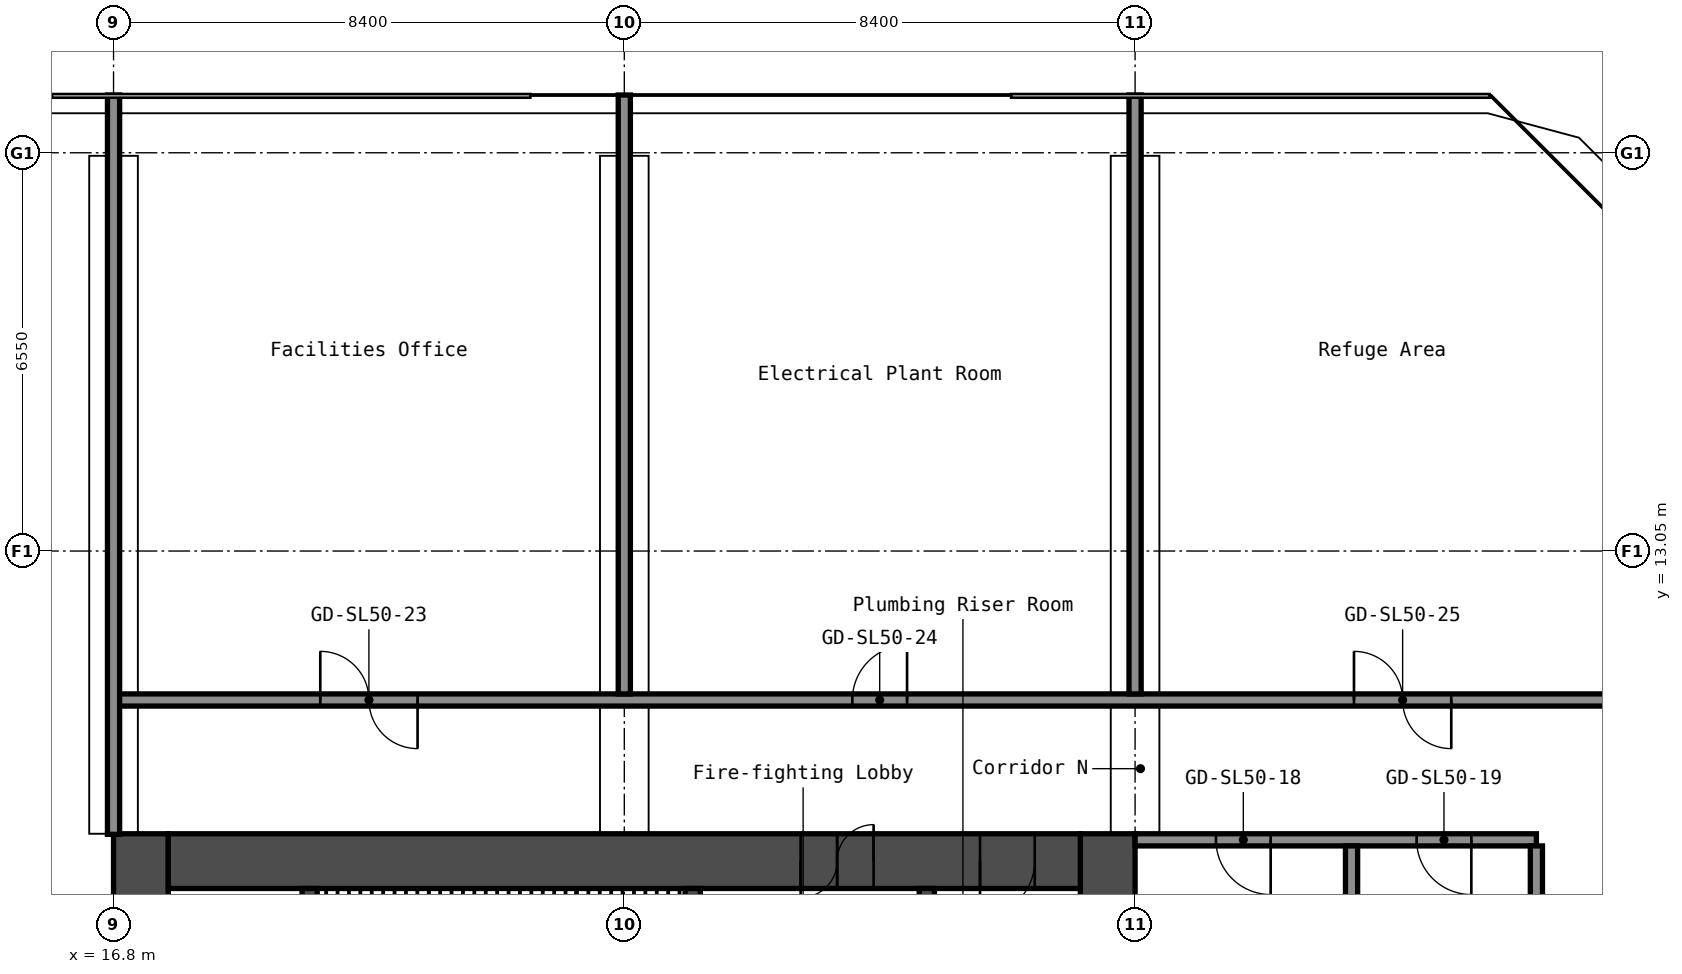
"""IFC4 building model, lengths in metres.
Left out: names, types, materials, properties, quantities, classifications, styles, units other than length and angle.
Written with IfcOpenShell. Run it as: python <this file> out.ifc"""

import sys

from ifc_helpers import new_model, si_unit, direction, frame, frame_2d, origin, place, context, subcontext, project, spatial, rectangle, extrude, element, fill, save


model = new_model("IFC4")
c1 = context("Model", 3, precision=1e-05, world=origin(), true_north=direction((0.0, 1.0)))
c2 = subcontext(c1, "Body", "Model", "MODEL_VIEW")
j1 = project(units=[si_unit("LENGTHUNIT", "METRE"), si_unit("PLANEANGLEUNIT", "RADIAN")], contexts=[c1])
p1 = place(None, origin())
s1 = spatial("IfcSite", under=j1, at=p1, CompositionType="ELEMENT")
p2 = place(p1, origin())
s2 = spatial("IfcBuilding", under=s1, at=p2, CompositionType="ELEMENT")
p3 = place(p2, frame((0.0, 0.0, 175.8)))
s3 = spatial("IfcBuildingStorey", under=s2, at=p3, CompositionType="ELEMENT", Elevation=175.8)
p4 = place(p3, frame((17.25, -8.4, 0.0), z_axis=(0.0, 0.0, 1.0), x_axis=(0.0, 1.0, 0.0)))
e1 = element("IfcWall", 1, at=p4, inside=s3, PredefinedType="SHEAR", context=c2, shape_type="SweptSolid", body=[
    extrude(rectangle(XDim=16.8, YDim=0.9, at=frame_2d((8.4, 0.0))), origin(), (0.0, 0.0, 1.0), 4.1),
])
p5 = place(p4, frame((10.1, 0.0, 0.0)))
e2 = element("IfcOpeningElement", 2, at=p5, cuts=e1, PredefinedType="OPENING", context=c2, shape_type="SweptSolid", body=[
    extrude(rectangle(XDim=1.6, YDim=2.1, at=frame_2d((0.8, 1.05))), frame((0.0, 0.46, 0.0), z_axis=(0.0, -1.0, 0.0), x_axis=(1.0, 0.0, 0.0)), (0.0, 0.0, 1.0), 0.92),
])
p6 = place(p3, frame((33.15, -8.4, 0.0), z_axis=(0.0, 0.0, 1.0), x_axis=(0.0, 1.0, 0.0)))
e3 = element("IfcWall", 3, at=p6, inside=s3, PredefinedType="SHEAR", context=c2, shape_type="SweptSolid", body=[
    extrude(rectangle(XDim=16.8, YDim=0.9, at=frame_2d((8.4, 0.0))), origin(), (0.0, 0.0, 1.0), 4.1),
])
p7 = place(p3, frame((17.7, 7.95, 0.0), z_axis=(0.0, 0.0, 1.0), x_axis=(1.0, 0.0, 0.0)))
e4 = element("IfcWall", 4, at=p7, inside=s3, PredefinedType="SHEAR", context=c2, shape_type="SweptSolid", body=[
    extrude(rectangle(XDim=15.0, YDim=0.9, at=frame_2d((7.5, 0.0))), origin(), (0.0, 0.0, 1.0), 4.1),
])
p8 = place(p7, frame((10.4, 0.0, 0.0)))
e5 = element("IfcOpeningElement", 5, at=p8, cuts=e4, PredefinedType="OPENING", context=c2, shape_type="SweptSolid", body=[
    extrude(rectangle(XDim=1.2, YDim=2.1, at=frame_2d((0.6, 1.05))), frame((0.0, 0.46, 0.0), z_axis=(0.0, -1.0, 0.0), x_axis=(1.0, 0.0, 0.0)), (0.0, 0.0, 1.0), 0.92),
])
p9 = place(p7, frame((13.35, 0.0, 0.0)))
e6 = element("IfcOpeningElement", 6, at=p9, cuts=e4, PredefinedType="OPENING", context=c2, shape_type="SweptSolid", body=[
    extrude(rectangle(XDim=0.9, YDim=2.1, at=frame_2d((0.45, 1.05))), frame((0.0, 0.46, 0.0), z_axis=(0.0, -1.0, 0.0), x_axis=(1.0, 0.0, 0.0)), (0.0, 0.0, 1.0), 0.92),
])
p10 = place(p3, frame((20.025, 1.2, 0.0), z_axis=(0.0, 0.0, 1.0), x_axis=(0.0, 1.0, 0.0)))
e7 = element("IfcWall", 7, at=p10, inside=s3, PredefinedType="SHEAR", context=c2, shape_type="SweptSolid", body=[
    extrude(rectangle(XDim=6.3, YDim=0.25, at=frame_2d((3.15, 0.0))), origin(), (0.0, 0.0, 1.0), 4.1),
])
p11 = place(p3, frame((26.325, 3.75, 0.0), z_axis=(0.0, 0.0, 1.0), x_axis=(0.0, 1.0, 0.0)))
e8 = element("IfcWall", 8, at=p11, inside=s3, PredefinedType="SHEAR", context=c2, shape_type="SweptSolid", body=[
    extrude(rectangle(XDim=3.75, YDim=0.25, at=frame_2d((1.875, 0.0))), origin(), (0.0, 0.0, 1.0), 4.1),
])
p12 = place(p11, frame((1.25, 0.0, 0.0)))
e9 = element("IfcOpeningElement", 9, at=p12, cuts=e8, PredefinedType="OPENING", context=c2, shape_type="SweptSolid", body=[
    extrude(rectangle(XDim=1.2, YDim=2.1, at=frame_2d((0.6, 1.05))), frame((0.0, 0.135, 0.0), z_axis=(0.0, -1.0, 0.0), x_axis=(1.0, 0.0, 0.0)), (0.0, 0.0, 1.0), 0.27),
])
p13 = place(p3, frame((30.175, 1.45, 0.0), z_axis=(0.0, 0.0, 1.0), x_axis=(0.0, 1.0, 0.0)))
e10 = element("IfcWall", 10, at=p13, inside=s3, PredefinedType="SHEAR", context=c2, shape_type="SweptSolid", body=[
    extrude(rectangle(XDim=6.05, YDim=0.25, at=frame_2d((3.025, 0.0))), origin(), (0.0, 0.0, 1.0), 4.1),
])
p14 = place(p13, frame((2.625, 0.0, 0.0)))
e11 = element("IfcOpeningElement", 11, at=p14, cuts=e10, PredefinedType="OPENING", context=c2, shape_type="SweptSolid", body=[
    extrude(rectangle(XDim=1.1, YDim=2.1, at=frame_2d((0.55, 1.05))), frame((0.0, 0.135, 0.0), z_axis=(0.0, -1.0, 0.0), x_axis=(1.0, 0.0, 0.0)), (0.0, 0.0, 1.0), 0.27),
])
p15 = place(p3, frame((33.6, 8.3, 0.0), z_axis=(0.0, 0.0, 1.0), x_axis=(1.0, 0.0, 0.0)))
e12 = element("IfcWall", 12, at=p15, inside=s3, PredefinedType="PARTITIONING", context=c2, shape_type="SweptSolid", body=[
    extrude(rectangle(XDim=6.6, YDim=0.2, at=frame_2d((3.3, 0.0))), origin(), (0.0, 0.0, 1.0), 4.1),
])
p16 = place(p15, frame((1.33, 0.0, 0.0)))
e13 = element("IfcOpeningElement", 13, at=p16, cuts=e12, PredefinedType="OPENING", context=c2, shape_type="SweptSolid", body=[
    extrude(rectangle(XDim=0.9, YDim=2.1, at=frame_2d((0.45, 1.05))), frame((0.0, 0.11, 0.0), z_axis=(0.0, -1.0, 0.0), x_axis=(1.0, 0.0, 0.0)), (0.0, 0.0, 1.0), 0.22),
])
p17 = place(p15, frame((4.63, 0.0, 0.0)))
e14 = element("IfcOpeningElement", 14, at=p17, cuts=e12, PredefinedType="OPENING", context=c2, shape_type="SweptSolid", body=[
    extrude(rectangle(XDim=0.9, YDim=2.1, at=frame_2d((0.45, 1.05))), frame((0.0, 0.11, 0.0), z_axis=(0.0, -1.0, 0.0), x_axis=(1.0, 0.0, 0.0)), (0.0, 0.0, 1.0), 0.22),
])
p18 = place(p3, frame((16.8, 10.6, 0.0), z_axis=(0.0, 0.0, 1.0), x_axis=(1.0, 0.0, 0.0)))
e15 = element("IfcWall", 15, at=p18, inside=s3, PredefinedType="PARTITIONING", context=c2, shape_type="SweptSolid", body=[
    extrude(rectangle(XDim=25.9, YDim=0.2, at=frame_2d((12.95, 0.0))), origin(), (0.0, 0.0, 1.0), 4.1),
])
p19 = place(p18, frame((3.4, 0.0, 0.0)))
e16 = element("IfcOpeningElement", 16, at=p19, cuts=e15, PredefinedType="OPENING", context=c2, shape_type="SweptSolid", body=[
    extrude(rectangle(XDim=1.6, YDim=2.1, at=frame_2d((0.8, 1.05))), frame((0.0, 0.11, 0.0), z_axis=(0.0, -1.0, 0.0), x_axis=(1.0, 0.0, 0.0)), (0.0, 0.0, 1.0), 0.22),
])
p20 = place(p18, frame((12.15, 0.0, 0.0)))
e17 = element("IfcOpeningElement", 17, at=p20, cuts=e15, PredefinedType="OPENING", context=c2, shape_type="SweptSolid", body=[
    extrude(rectangle(XDim=0.9, YDim=2.1, at=frame_2d((0.45, 1.05))), frame((0.0, 0.11, 0.0), z_axis=(0.0, -1.0, 0.0), x_axis=(1.0, 0.0, 0.0)), (0.0, 0.0, 1.0), 0.22),
])
p21 = place(p18, frame((20.4, 0.0, 0.0)))
e18 = element("IfcOpeningElement", 18, at=p21, cuts=e15, PredefinedType="OPENING", context=c2, shape_type="SweptSolid", body=[
    extrude(rectangle(XDim=1.6, YDim=2.1, at=frame_2d((0.8, 1.05))), frame((0.0, 0.11, 0.0), z_axis=(0.0, -1.0, 0.0), x_axis=(1.0, 0.0, 0.0)), (0.0, 0.0, 1.0), 0.22),
])
p22 = place(p3, frame((16.8, 8.39, 0.0), z_axis=(0.0, 0.0, 1.0), x_axis=(0.0, 1.0, 0.0)))
e19 = element("IfcWall", 19, at=p22, inside=s3, PredefinedType="PARTITIONING", context=c2, shape_type="SweptSolid", body=[
    extrude(rectangle(XDim=12.16, YDim=0.2, at=frame_2d((6.08, 0.0))), origin(), (0.0, 0.0, 1.0), 4.1),
])
for number, where, z_axis, x_axis in (
    (20, (25.2, 10.7, 0.0), (0.0, 0.0, 1.0), (0.0, 1.0, 0.0)),
    (21, (33.6, 10.7, 0.0), (0.0, 0.0, 1.0), (0.0, 1.0, 0.0)),
):
    element("IfcWall", number, at=place(p3, frame(where, z_axis=z_axis, x_axis=x_axis)), inside=s3, PredefinedType="PARTITIONING", context=c2, shape_type="SweptSolid", body=[
        extrude(rectangle(XDim=9.85, YDim=0.2, at=frame_2d((4.925, 0.0))), origin(), (0.0, 0.0, 1.0), 4.1),
    ])
p23 = place(p3, frame((37.16, 0.0, 0.0), z_axis=(0.0, 0.0, 1.0), x_axis=(0.0, 1.0, 0.0)))
e22 = element("IfcWall", 22, at=p23, inside=s3, PredefinedType="PARTITIONING", context=c2, shape_type="SweptSolid", body=[
    extrude(rectangle(XDim=8.2, YDim=0.2, at=frame_2d((4.1, 0.0))), origin(), (0.0, 0.0, 1.0), 4.1),
])
p24 = place(p3, frame((40.2, -8.2, 0.0), z_axis=(0.0, 0.0, 1.0), x_axis=(0.0, 1.0, 0.0)))
e23 = element("IfcWall", 23, at=p24, inside=s3, PredefinedType="PARTITIONING", context=c2, shape_type="SweptSolid", body=[
    extrude(rectangle(XDim=16.4, YDim=0.2, at=frame_2d((8.2, 0.0))), origin(), (0.0, 0.0, 1.0), 4.1),
])
p25 = place(p8, origin())
e24 = element("IfcDoor", 24, at=p25, inside=s3, OperationType="DOUBLE_DOOR_SINGLE_SWING", PredefinedType="DOOR", context=c2, shape_type="SweptSolid", body=[
    extrude(rectangle(XDim=1.2, YDim=2.1, at=frame_2d((0.6, 1.05))), frame((0.0, 0.025, 0.0), z_axis=(0.0, -1.0, 0.0), x_axis=(1.0, 0.0, 0.0)), (0.0, 0.0, 1.0), 0.05),
])
fill(e5, e24)
p26 = place(p9, origin())
e25 = element("IfcDoor", 25, at=p26, inside=s3, OperationType="SINGLE_SWING_LEFT", PredefinedType="DOOR", context=c2, shape_type="SweptSolid", body=[
    extrude(rectangle(XDim=0.9, YDim=2.1, at=frame_2d((0.45, 1.05))), frame((0.0, 0.025, 0.0), z_axis=(0.0, -1.0, 0.0), x_axis=(1.0, 0.0, 0.0)), (0.0, 0.0, 1.0), 0.05),
])
fill(e6, e25)
p27 = place(p16, origin())
e26 = element("IfcDoor", 26, at=p27, inside=s3, OperationType="SINGLE_SWING_RIGHT", PredefinedType="DOOR", context=c2, shape_type="SweptSolid", body=[
    extrude(rectangle(XDim=0.9, YDim=2.1, at=frame_2d((0.45, 1.05))), frame((0.0, 0.025, 0.0), z_axis=(0.0, -1.0, 0.0), x_axis=(1.0, 0.0, 0.0)), (0.0, 0.0, 1.0), 0.05),
])
fill(e13, e26)
p28 = place(p17, origin())
e27 = element("IfcDoor", 27, at=p28, inside=s3, OperationType="SINGLE_SWING_RIGHT", PredefinedType="DOOR", context=c2, shape_type="SweptSolid", body=[
    extrude(rectangle(XDim=0.9, YDim=2.1, at=frame_2d((0.45, 1.05))), frame((0.0, 0.025, 0.0), z_axis=(0.0, -1.0, 0.0), x_axis=(1.0, 0.0, 0.0)), (0.0, 0.0, 1.0), 0.05),
])
fill(e14, e27)
p29 = place(p19, origin())
e28 = element("IfcDoor", 28, at=p29, inside=s3, OperationType="DOUBLE_DOOR_SINGLE_SWING", PredefinedType="DOOR", context=c2, shape_type="SweptSolid", body=[
    extrude(rectangle(XDim=1.6, YDim=2.1, at=frame_2d((0.8, 1.05))), frame((0.0, 0.025, 0.0), z_axis=(0.0, -1.0, 0.0), x_axis=(1.0, 0.0, 0.0)), (0.0, 0.0, 1.0), 0.05),
])
fill(e16, e28)
p30 = place(p20, origin())
e29 = element("IfcDoor", 29, at=p30, inside=s3, OperationType="SINGLE_SWING_LEFT", PredefinedType="DOOR", context=c2, shape_type="SweptSolid", body=[
    extrude(rectangle(XDim=0.9, YDim=2.1, at=frame_2d((0.45, 1.05))), frame((0.0, 0.025, 0.0), z_axis=(0.0, -1.0, 0.0), x_axis=(1.0, 0.0, 0.0)), (0.0, 0.0, 1.0), 0.05),
])
fill(e17, e29)
p31 = place(p21, origin())
e30 = element("IfcDoor", 30, at=p31, inside=s3, OperationType="DOUBLE_DOOR_SINGLE_SWING", PredefinedType="DOOR", context=c2, shape_type="SweptSolid", body=[
    extrude(rectangle(XDim=1.6, YDim=2.1, at=frame_2d((0.8, 1.05))), frame((0.0, 0.025, 0.0), z_axis=(0.0, -1.0, 0.0), x_axis=(1.0, 0.0, 0.0)), (0.0, 0.0, 1.0), 0.05),
])
fill(e18, e30)
save(model, sys.argv[1])
